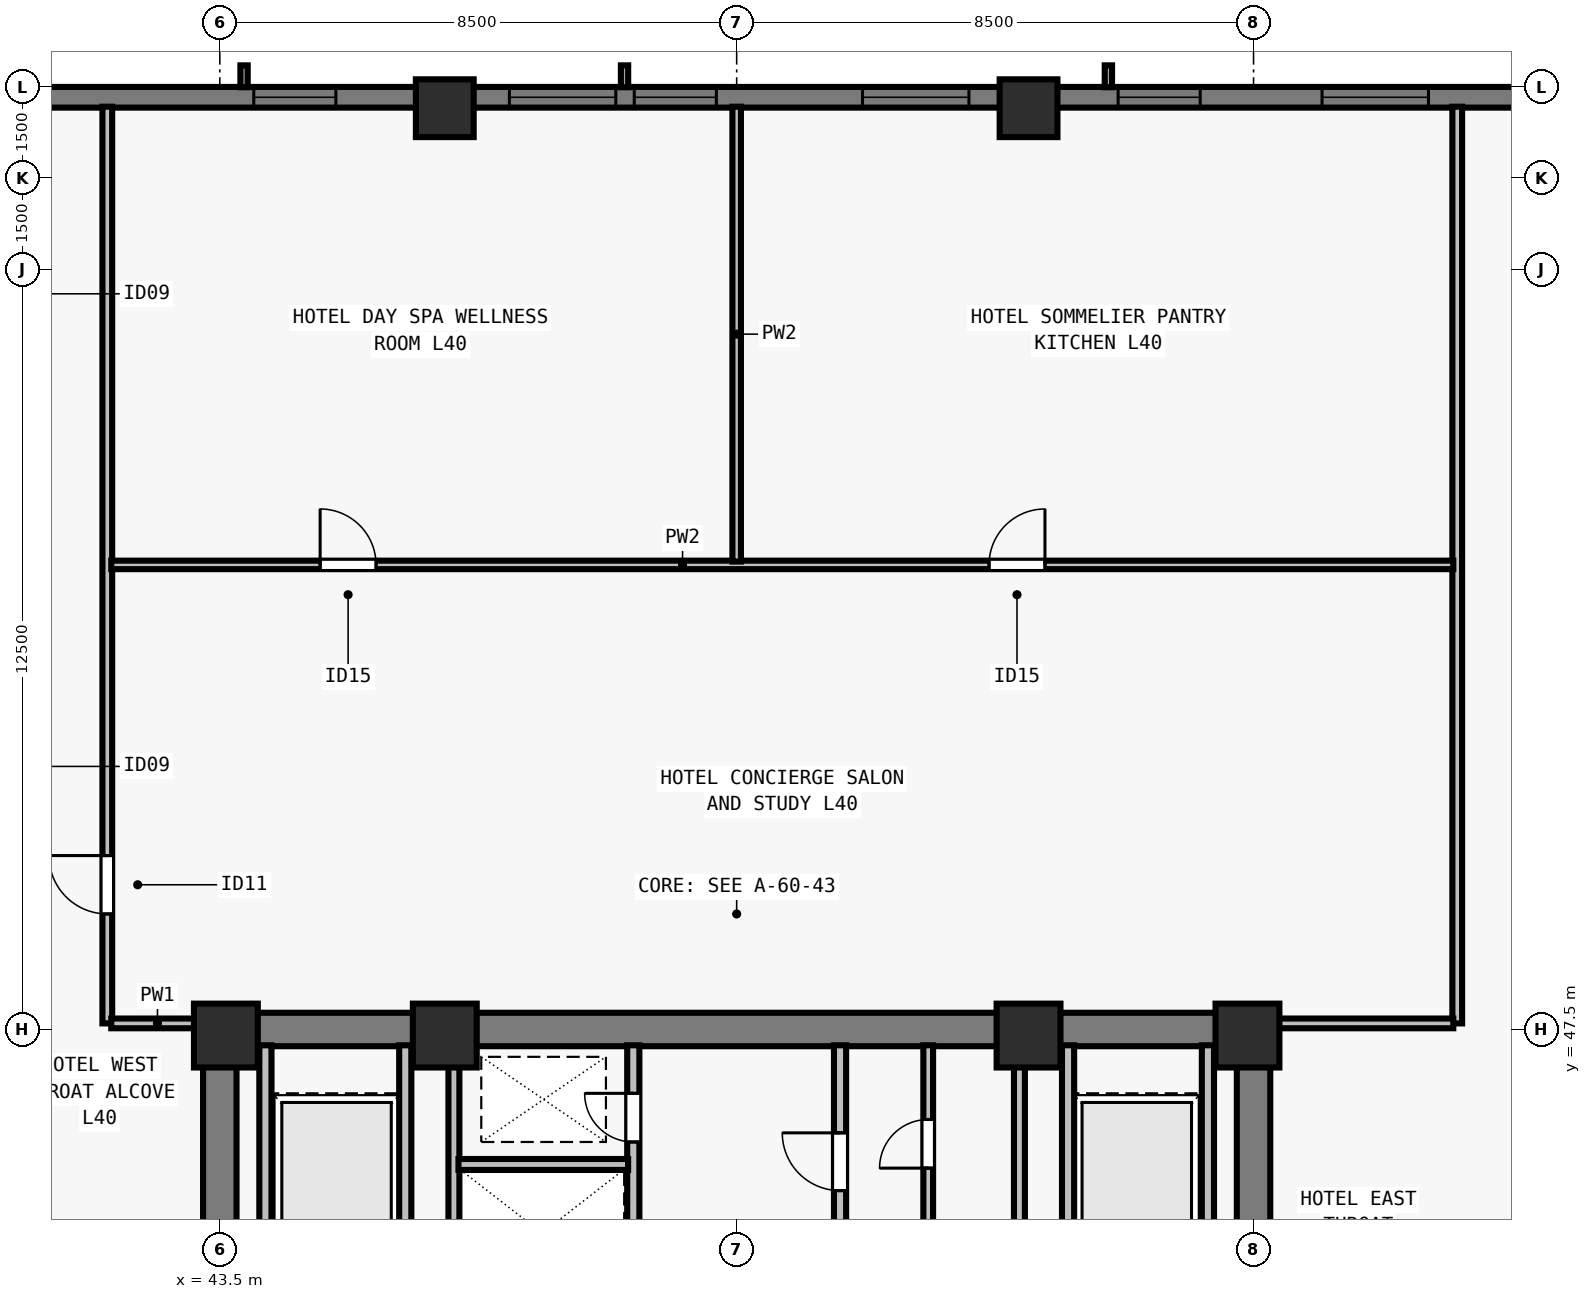
"""IFC4 building model, lengths in metres.
Left out: names, types, materials, properties, quantities, classifications, styles, units other than length and angle.
Written with IfcOpenShell. Run it as: python <this file> out.ifc"""

import sys

from ifc_helpers import new_model, si_unit, direction, frame, frame_2d, origin, origin_2d, place, context, subcontext, project, spatial, rectangle, extrude, element, fill, save


model = new_model("IFC4")
c1 = context("Model", 3, precision=1e-05, world=origin(), true_north=direction((0.0, 1.0)))
c2 = subcontext(c1, "Body", "Model", "MODEL_VIEW")
j1 = project(units=[si_unit("LENGTHUNIT", "METRE"), si_unit("PLANEANGLEUNIT", "RADIAN")], contexts=[c1])
p1 = place(None, origin())
s1 = spatial("IfcSite", under=j1, at=p1, CompositionType="ELEMENT")
p2 = place(p1, origin())
s2 = spatial("IfcBuilding", under=s1, at=p2, CompositionType="ELEMENT")
p3 = place(p2, frame((0.0, 0.0, 148.0)))
s3 = spatial("IfcBuildingStorey", under=s2, at=p3, CompositionType="ELEMENT", Elevation=148.0)
for number, where, z_axis, x_axis in (
    (1, (43.6, 47.4, 0.0), (0.0, 0.0, 1.0), (1.0, 0.0, 0.0)),
    (2, (47.2, 47.4, 0.0), (0.0, 0.0, 1.0), (1.0, 0.0, 0.0)),
    (3, (56.8, 47.4, 0.0), (0.0, 0.0, 1.0), (1.0, 0.0, 0.0)),
    (4, (60.4, 47.4, 0.0), (0.0, 0.0, 1.0), (1.0, 0.0, 0.0)),
):
    element("IfcColumn", number, at=place(p3, frame(where, z_axis=z_axis, x_axis=x_axis)), inside=s3, PredefinedType="COLUMN", context=c2, shape_type="SweptSolid", body=[
        extrude(rectangle(XDim=1.05, YDim=1.05, at=origin_2d()), origin(), (0.0, 0.0, 1.0), 3.5),
    ])
for number, where, z_axis, x_axis in (
    (5, (56.8, 62.65, 0.0), (0.0, 0.0, 1.0), (1.0, 0.0, 0.0)),
    (6, (47.2, 62.65, 0.0), (0.0, 0.0, 1.0), (1.0, 0.0, 0.0)),
):
    element("IfcColumn", number, at=place(p3, frame(where, z_axis=z_axis, x_axis=x_axis)), inside=s3, PredefinedType="COLUMN", context=c2, shape_type="SweptSolid", body=[
        extrude(rectangle(XDim=0.95, YDim=0.95, at=origin_2d()), origin(), (0.0, 0.0, 1.0), 3.5),
    ])
p4 = place(p3, frame((32.0, 62.83, 0.0), z_axis=(0.0, 0.0, 1.0), x_axis=(1.0, 0.0, 0.0)))
e7 = element("IfcWall", 7, at=p4, inside=s3, PredefinedType="SOLIDWALL", context=c2, shape_type="SweptSolid", body=[
    extrude(rectangle(XDim=39.682, YDim=0.34, at=frame_2d((19.841, 0.0))), origin(), (0.0, 0.0, 1.0), 3.28),
])
p5 = place(p4, frame((4.952, 0.0, 0.8)))
e8 = element("IfcOpeningElement", 8, at=p5, cuts=e7, PredefinedType="OPENING", context=c2, shape_type="SweptSolid", body=[
    extrude(rectangle(XDim=1.35, YDim=1.66, at=frame_2d((0.675, 0.83))), frame((0.0, 0.18, 0.0), z_axis=(0.0, -1.0, 0.0), x_axis=(1.0, 0.0, 0.0)), (0.0, 0.0, 1.0), 0.36),
])
p6 = place(p4, frame((12.059, 0.0, 0.8)))
e9 = element("IfcOpeningElement", 9, at=p6, cuts=e7, PredefinedType="OPENING", context=c2, shape_type="SweptSolid", body=[
    extrude(rectangle(XDim=1.35, YDim=1.66, at=frame_2d((0.675, 0.83))), frame((0.0, 0.18, 0.0), z_axis=(0.0, -1.0, 0.0), x_axis=(1.0, 0.0, 0.0)), (0.0, 0.0, 1.0), 0.36),
])
p7 = place(p4, frame((16.262, 0.0, 0.8)))
e10 = element("IfcOpeningElement", 10, at=p7, cuts=e7, PredefinedType="OPENING", context=c2, shape_type="SweptSolid", body=[
    extrude(rectangle(XDim=1.75, YDim=1.66, at=frame_2d((0.875, 0.83))), frame((0.0, 0.18, 0.0), z_axis=(0.0, -1.0, 0.0), x_axis=(1.0, 0.0, 0.0)), (0.0, 0.0, 1.0), 0.36),
])
p8 = place(p4, frame((18.316, 0.0, 0.8)))
e11 = element("IfcOpeningElement", 11, at=p8, cuts=e7, PredefinedType="OPENING", context=c2, shape_type="SweptSolid", body=[
    extrude(rectangle(XDim=1.35, YDim=1.66, at=frame_2d((0.675, 0.83))), frame((0.0, 0.18, 0.0), z_axis=(0.0, -1.0, 0.0), x_axis=(1.0, 0.0, 0.0)), (0.0, 0.0, 1.0), 0.36),
])
p9 = place(p4, frame((22.07, 0.0, 0.8)))
e12 = element("IfcOpeningElement", 12, at=p9, cuts=e7, PredefinedType="OPENING", context=c2, shape_type="SweptSolid", body=[
    extrude(rectangle(XDim=1.75, YDim=1.66, at=frame_2d((0.875, 0.83))), frame((0.0, 0.18, 0.0), z_axis=(0.0, -1.0, 0.0), x_axis=(1.0, 0.0, 0.0)), (0.0, 0.0, 1.0), 0.36),
])
p10 = place(p4, frame((26.273, 0.0, 0.8)))
e13 = element("IfcOpeningElement", 13, at=p10, cuts=e7, PredefinedType="OPENING", context=c2, shape_type="SweptSolid", body=[
    extrude(rectangle(XDim=1.35, YDim=1.66, at=frame_2d((0.675, 0.83))), frame((0.0, 0.18, 0.0), z_axis=(0.0, -1.0, 0.0), x_axis=(1.0, 0.0, 0.0)), (0.0, 0.0, 1.0), 0.36),
])
p11 = place(p4, frame((29.627, 0.0, 0.8)))
e14 = element("IfcOpeningElement", 14, at=p11, cuts=e7, PredefinedType="OPENING", context=c2, shape_type="SweptSolid", body=[
    extrude(rectangle(XDim=1.75, YDim=1.66, at=frame_2d((0.875, 0.83))), frame((0.0, 0.18, 0.0), z_axis=(0.0, -1.0, 0.0), x_axis=(1.0, 0.0, 0.0)), (0.0, 0.0, 1.0), 0.36),
])
p12 = place(p3, frame((43.225, 47.5, 0.0), z_axis=(0.0, 0.0, 1.0), x_axis=(1.0, 0.0, 0.0)))
e15 = element("IfcWall", 15, at=p12, inside=s3, PredefinedType="SHEAR", context=c2, shape_type="SweptSolid", body=[
    extrude(rectangle(XDim=17.55, YDim=0.55, at=frame_2d((8.775, 0.0))), origin(), (0.0, 0.0, 1.0), 3.28),
])
for number, where, z_axis, x_axis in (
    (16, (43.5, 40.8, 0.0), (0.0, 0.0, 1.0), (0.0, 1.0, 0.0)),
    (17, (60.5, 40.8, 0.0), (0.0, 0.0, 1.0), (0.0, 1.0, 0.0)),
):
    element("IfcWall", number, at=place(p3, frame(where, z_axis=z_axis, x_axis=x_axis)), inside=s3, PredefinedType="SHEAR", context=c2, shape_type="SweptSolid", body=[
        extrude(rectangle(XDim=6.435, YDim=0.55, at=frame_2d((3.218, 0.0))), origin(), (0.0, 0.0, 1.0), 3.28),
    ])
p13 = place(p3, frame((50.3, 40.585, 0.0), z_axis=(0.0, 0.0, 1.0), x_axis=(0.0, 1.0, 0.0)))
e18 = element("IfcWall", 18, at=p13, inside=s3, PredefinedType="SOLIDWALL", context=c2, shape_type="SweptSolid", body=[
    extrude(rectangle(XDim=6.655, YDim=0.2, at=frame_2d((3.328, 0.0))), origin(), (0.0, 0.0, 1.0), 3.28),
])
p14 = place(p13, frame((5.065, 0.0, 0.0)))
e19 = element("IfcOpeningElement", 19, at=p14, cuts=e18, PredefinedType="OPENING", context=c2, shape_type="SweptSolid", body=[
    extrude(rectangle(XDim=0.8, YDim=2.08, at=frame_2d((0.4, 1.04))), frame((0.0, 0.11, 0.0), z_axis=(0.0, -1.0, 0.0), x_axis=(1.0, 0.0, 0.0)), (0.0, 0.0, 1.0), 0.22),
])
p15 = place(p3, frame((53.7, 40.585, 0.0), z_axis=(0.0, 0.0, 1.0), x_axis=(0.0, 1.0, 0.0)))
e20 = element("IfcWall", 20, at=p15, inside=s3, PredefinedType="SOLIDWALL", context=c2, shape_type="SweptSolid", body=[
    extrude(rectangle(XDim=6.655, YDim=0.2, at=frame_2d((3.328, 0.0))), origin(), (0.0, 0.0, 1.0), 3.28),
])
p16 = place(p15, frame((0.195, 0.0, 0.0)))
e21 = element("IfcOpeningElement", 21, at=p16, cuts=e20, PredefinedType="OPENING", context=c2, shape_type="SweptSolid", body=[
    extrude(rectangle(XDim=0.8, YDim=2.08, at=frame_2d((0.4, 1.04))), frame((0.0, 0.11, 0.0), z_axis=(0.0, -1.0, 0.0), x_axis=(1.0, 0.0, 0.0)), (0.0, 0.0, 1.0), 0.22),
])
p17 = place(p15, frame((4.265, 0.0, 0.0)))
e22 = element("IfcOpeningElement", 22, at=p17, cuts=e20, PredefinedType="OPENING", context=c2, shape_type="SweptSolid", body=[
    extrude(rectangle(XDim=0.95, YDim=2.12, at=frame_2d((0.475, 1.06))), frame((0.0, 0.11, 0.0), z_axis=(0.0, -1.0, 0.0), x_axis=(1.0, 0.0, 0.0)), (0.0, 0.0, 1.0), 0.22),
])
for number, where, z_axis, x_axis in (
    (23, (46.55, 43.735, 0.0), (0.0, 0.0, 1.0), (0.0, 1.0, 0.0)),
    (24, (44.25, 43.735, 0.0), (0.0, 0.0, 1.0), (0.0, 1.0, 0.0)),
    (25, (57.45, 43.735, 0.0), (0.0, 0.0, 1.0), (0.0, 1.0, 0.0)),
    (26, (59.75, 43.735, 0.0), (0.0, 0.0, 1.0), (0.0, 1.0, 0.0)),
):
    element("IfcWall", number, at=place(p3, frame(where, z_axis=z_axis, x_axis=x_axis)), inside=s3, PredefinedType="SOLIDWALL", context=c2, shape_type="SweptSolid", body=[
        extrude(rectangle(XDim=3.505, YDim=0.2, at=frame_2d((1.752, 0.0))), origin(), (0.0, 0.0, 1.0), 3.28),
    ])
p18 = place(p3, frame((47.35, 43.735, 0.0), z_axis=(0.0, 0.0, 1.0), x_axis=(0.0, 1.0, 0.0)))
e27 = element("IfcWall", 27, at=p18, inside=s3, PredefinedType="SOLIDWALL", context=c2, shape_type="SweptSolid", body=[
    extrude(rectangle(XDim=3.505, YDim=0.18, at=frame_2d((1.752, 0.0))), origin(), (0.0, 0.0, 1.0), 3.28),
])
p19 = place(p3, frame((47.425, 45.28, 0.0), z_axis=(0.0, 0.0, 1.0), x_axis=(1.0, 0.0, 0.0)))
e28 = element("IfcWall", 28, at=p19, inside=s3, PredefinedType="SOLIDWALL", context=c2, shape_type="SweptSolid", body=[
    extrude(rectangle(XDim=2.79, YDim=0.18, at=frame_2d((1.395, 0.0))), origin(), (0.0, 0.0, 1.0), 3.28),
])
p20 = place(p3, frame((56.65, 43.735, 0.0), z_axis=(0.0, 0.0, 1.0), x_axis=(0.0, 1.0, 0.0)))
e29 = element("IfcWall", 29, at=p20, inside=s3, PredefinedType="SOLIDWALL", context=c2, shape_type="SweptSolid", body=[
    extrude(rectangle(XDim=3.505, YDim=0.18, at=frame_2d((1.752, 0.0))), origin(), (0.0, 0.0, 1.0), 3.28),
])
p21 = place(p3, frame((55.15, 44.195, 0.0), z_axis=(0.0, 0.0, 1.0), x_axis=(0.0, 1.0, 0.0)))
e30 = element("IfcWall", 30, at=p21, inside=s3, PredefinedType="PARTITIONING", context=c2, shape_type="SweptSolid", body=[
    extrude(rectangle(XDim=3.045, YDim=0.16, at=frame_2d((1.522, 0.0))), origin(), (0.0, 0.0, 1.0), 3.28),
])
p22 = place(p21, frame((1.025, 0.0, 0.0)))
e31 = element("IfcOpeningElement", 31, at=p22, cuts=e30, PredefinedType="OPENING", context=c2, shape_type="SweptSolid", body=[
    extrude(rectangle(XDim=0.8, YDim=2.1, at=frame_2d((0.4, 1.05))), frame((0.0, 0.09, 0.0), z_axis=(0.0, -1.0, 0.0), x_axis=(1.0, 0.0, 0.0)), (0.0, 0.0, 1.0), 0.18),
])
p23 = place(p3, frame((41.65, 47.6, 0.0), z_axis=(0.0, 0.0, 1.0), x_axis=(0.0, 1.0, 0.0)))
e32 = element("IfcWall", 32, at=p23, inside=s3, PredefinedType="PARTITIONING", context=c2, shape_type="SweptSolid", body=[
    extrude(rectangle(XDim=15.075, YDim=0.16, at=frame_2d((7.538, 0.0))), origin(), (0.0, 0.0, 1.0), 2.555),
])
p24 = place(p23, frame((1.8, 0.0, 0.0)))
e33 = element("IfcOpeningElement", 33, at=p24, cuts=e32, PredefinedType="OPENING", context=c2, shape_type="SweptSolid", body=[
    extrude(rectangle(XDim=0.96, YDim=2.12, at=frame_2d((0.48, 1.06))), frame((0.0, 0.09, 0.0), z_axis=(0.0, -1.0, 0.0), x_axis=(1.0, 0.0, 0.0)), (0.0, 0.0, 1.0), 0.18),
])
p25 = place(p3, frame((41.715, 47.6, 0.0), z_axis=(0.0, 0.0, 1.0), x_axis=(1.0, 0.0, 0.0)))
e34 = element("IfcWall", 34, at=p25, inside=s3, PredefinedType="PARTITIONING", context=c2, shape_type="SweptSolid", body=[
    extrude(rectangle(XDim=1.52, YDim=0.16, at=frame_2d((0.76, 0.0))), origin(), (0.0, 0.0, 1.0), 3.28),
])
p26 = place(p3, frame((63.85, 47.6, 0.0), z_axis=(0.0, 0.0, 1.0), x_axis=(0.0, 1.0, 0.0)))
e35 = element("IfcWall", 35, at=p26, inside=s3, PredefinedType="PARTITIONING", context=c2, shape_type="SweptSolid", body=[
    extrude(rectangle(XDim=15.075, YDim=0.16, at=frame_2d((7.538, 0.0))), origin(), (0.0, 0.0, 1.0), 2.555),
])
p27 = place(p3, frame((60.765, 47.6, 0.0), z_axis=(0.0, 0.0, 1.0), x_axis=(1.0, 0.0, 0.0)))
e36 = element("IfcWall", 36, at=p27, inside=s3, PredefinedType="PARTITIONING", context=c2, shape_type="SweptSolid", body=[
    extrude(rectangle(XDim=3.02, YDim=0.16, at=frame_2d((1.51, 0.0))), origin(), (0.0, 0.0, 1.0), 3.28),
])
p28 = place(p3, frame((41.715, 55.14, 0.0), z_axis=(0.0, 0.0, 1.0), x_axis=(1.0, 0.0, 0.0)))
e37 = element("IfcWall", 37, at=p28, inside=s3, PredefinedType="PARTITIONING", context=c2, shape_type="SweptSolid", body=[
    extrude(rectangle(XDim=22.07, YDim=0.14, at=frame_2d((11.035, 0.0))), origin(), (0.0, 0.0, 1.0), 3.28),
])
p29 = place(p28, frame((3.435, 0.0, 0.0)))
e38 = element("IfcOpeningElement", 38, at=p29, cuts=e37, PredefinedType="OPENING", context=c2, shape_type="SweptSolid", body=[
    extrude(rectangle(XDim=0.92, YDim=2.12, at=frame_2d((0.46, 1.06))), frame((0.0, 0.08, 0.0), z_axis=(0.0, -1.0, 0.0), x_axis=(1.0, 0.0, 0.0)), (0.0, 0.0, 1.0), 0.16),
])
p30 = place(p28, frame((14.435, 0.0, 0.0)))
e39 = element("IfcOpeningElement", 39, at=p30, cuts=e37, PredefinedType="OPENING", context=c2, shape_type="SweptSolid", body=[
    extrude(rectangle(XDim=0.92, YDim=2.12, at=frame_2d((0.46, 1.06))), frame((0.0, 0.08, 0.0), z_axis=(0.0, -1.0, 0.0), x_axis=(1.0, 0.0, 0.0)), (0.0, 0.0, 1.0), 0.16),
])
p31 = place(p3, frame((52.0, 55.195, 0.0), z_axis=(0.0, 0.0, 1.0), x_axis=(0.0, 1.0, 0.0)))
e40 = element("IfcWall", 40, at=p31, inside=s3, PredefinedType="PARTITIONING", context=c2, shape_type="SweptSolid", body=[
    extrude(rectangle(XDim=7.48, YDim=0.14, at=frame_2d((3.74, 0.0))), origin(), (0.0, 0.0, 1.0), 3.28),
])
p32 = place(p6, origin())
e41 = element("IfcWindow", 41, at=p32, inside=s3, PartitioningType="SINGLE_PANEL", PredefinedType="WINDOW", context=c2, shape_type="SweptSolid", body=[
    extrude(rectangle(XDim=1.35, YDim=1.66, at=frame_2d((0.675, 0.83))), frame((0.0, -0.05, 0.0), z_axis=(0.0, -1.0, 0.0), x_axis=(1.0, 0.0, 0.0)), (0.0, 0.0, 1.0), 0.06),
])
fill(e9, e41)
p33 = place(p7, origin())
e42 = element("IfcWindow", 42, at=p33, inside=s3, PartitioningType="SINGLE_PANEL", PredefinedType="WINDOW", context=c2, shape_type="SweptSolid", body=[
    extrude(rectangle(XDim=1.75, YDim=1.66, at=frame_2d((0.875, 0.83))), frame((0.0, -0.05, 0.0), z_axis=(0.0, -1.0, 0.0), x_axis=(1.0, 0.0, 0.0)), (0.0, 0.0, 1.0), 0.06),
])
fill(e10, e42)
p34 = place(p8, origin())
e43 = element("IfcWindow", 43, at=p34, inside=s3, PartitioningType="SINGLE_PANEL", PredefinedType="WINDOW", context=c2, shape_type="SweptSolid", body=[
    extrude(rectangle(XDim=1.35, YDim=1.66, at=frame_2d((0.675, 0.83))), frame((0.0, -0.05, 0.0), z_axis=(0.0, -1.0, 0.0), x_axis=(1.0, 0.0, 0.0)), (0.0, 0.0, 1.0), 0.06),
])
fill(e11, e43)
p35 = place(p9, origin())
e44 = element("IfcWindow", 44, at=p35, inside=s3, PartitioningType="SINGLE_PANEL", PredefinedType="WINDOW", context=c2, shape_type="SweptSolid", body=[
    extrude(rectangle(XDim=1.75, YDim=1.66, at=frame_2d((0.875, 0.83))), frame((0.0, -0.05, 0.0), z_axis=(0.0, -1.0, 0.0), x_axis=(1.0, 0.0, 0.0)), (0.0, 0.0, 1.0), 0.06),
])
fill(e12, e44)
p36 = place(p10, origin())
e45 = element("IfcWindow", 45, at=p36, inside=s3, PartitioningType="SINGLE_PANEL", PredefinedType="WINDOW", context=c2, shape_type="SweptSolid", body=[
    extrude(rectangle(XDim=1.35, YDim=1.66, at=frame_2d((0.675, 0.83))), frame((0.0, -0.05, 0.0), z_axis=(0.0, -1.0, 0.0), x_axis=(1.0, 0.0, 0.0)), (0.0, 0.0, 1.0), 0.06),
])
fill(e13, e45)
p37 = place(p11, origin())
e46 = element("IfcWindow", 46, at=p37, inside=s3, PartitioningType="SINGLE_PANEL", PredefinedType="WINDOW", context=c2, shape_type="SweptSolid", body=[
    extrude(rectangle(XDim=1.75, YDim=1.66, at=frame_2d((0.875, 0.83))), frame((0.0, -0.05, 0.0), z_axis=(0.0, -1.0, 0.0), x_axis=(1.0, 0.0, 0.0)), (0.0, 0.0, 1.0), 0.06),
])
fill(e14, e46)
p38 = place(p14, origin())
e47 = element("IfcDoor", 47, at=p38, inside=s3, OperationType="SINGLE_SWING_RIGHT", PredefinedType="DOOR", context=c2, shape_type="SweptSolid", body=[
    extrude(rectangle(XDim=0.8, YDim=2.08, at=frame_2d((0.4, 1.04))), frame((0.0, 0.025, 0.0), z_axis=(0.0, -1.0, 0.0), x_axis=(1.0, 0.0, 0.0)), (0.0, 0.0, 1.0), 0.05),
])
fill(e19, e47)
p39 = place(p17, origin())
e48 = element("IfcDoor", 48, at=p39, inside=s3, OperationType="SINGLE_SWING_RIGHT", PredefinedType="DOOR", context=c2, shape_type="SweptSolid", body=[
    extrude(rectangle(XDim=0.95, YDim=2.12, at=frame_2d((0.475, 1.06))), frame((0.0, 0.025, 0.0), z_axis=(0.0, -1.0, 0.0), x_axis=(1.0, 0.0, 0.0)), (0.0, 0.0, 1.0), 0.05),
])
fill(e22, e48)
p40 = place(p22, origin())
e49 = element("IfcDoor", 49, at=p40, inside=s3, OperationType="SINGLE_SWING_LEFT", PredefinedType="DOOR", context=c2, shape_type="SweptSolid", body=[
    extrude(rectangle(XDim=0.8, YDim=2.1, at=frame_2d((0.4, 1.05))), frame((0.0, 0.025, 0.0), z_axis=(0.0, -1.0, 0.0), x_axis=(1.0, 0.0, 0.0)), (0.0, 0.0, 1.0), 0.05),
])
fill(e31, e49)
p41 = place(p24, origin())
e50 = element("IfcDoor", 50, at=p41, inside=s3, OperationType="SINGLE_SWING_RIGHT", PredefinedType="DOOR", context=c2, shape_type="SweptSolid", body=[
    extrude(rectangle(XDim=0.96, YDim=2.12, at=frame_2d((0.48, 1.06))), frame((0.0, 0.025, 0.0), z_axis=(0.0, -1.0, 0.0), x_axis=(1.0, 0.0, 0.0)), (0.0, 0.0, 1.0), 0.05),
])
fill(e33, e50)
p42 = place(p29, origin())
e51 = element("IfcDoor", 51, at=p42, inside=s3, OperationType="SINGLE_SWING_LEFT", PredefinedType="DOOR", context=c2, shape_type="SweptSolid", body=[
    extrude(rectangle(XDim=0.92, YDim=2.12, at=frame_2d((0.46, 1.06))), frame((0.0, 0.025, 0.0), z_axis=(0.0, -1.0, 0.0), x_axis=(1.0, 0.0, 0.0)), (0.0, 0.0, 1.0), 0.05),
])
fill(e38, e51)
p43 = place(p30, origin())
e52 = element("IfcDoor", 52, at=p43, inside=s3, OperationType="SINGLE_SWING_RIGHT", PredefinedType="DOOR", context=c2, shape_type="SweptSolid", body=[
    extrude(rectangle(XDim=0.92, YDim=2.12, at=frame_2d((0.46, 1.06))), frame((0.0, 0.025, 0.0), z_axis=(0.0, -1.0, 0.0), x_axis=(1.0, 0.0, 0.0)), (0.0, 0.0, 1.0), 0.05),
])
fill(e39, e52)
save(model, sys.argv[1])
